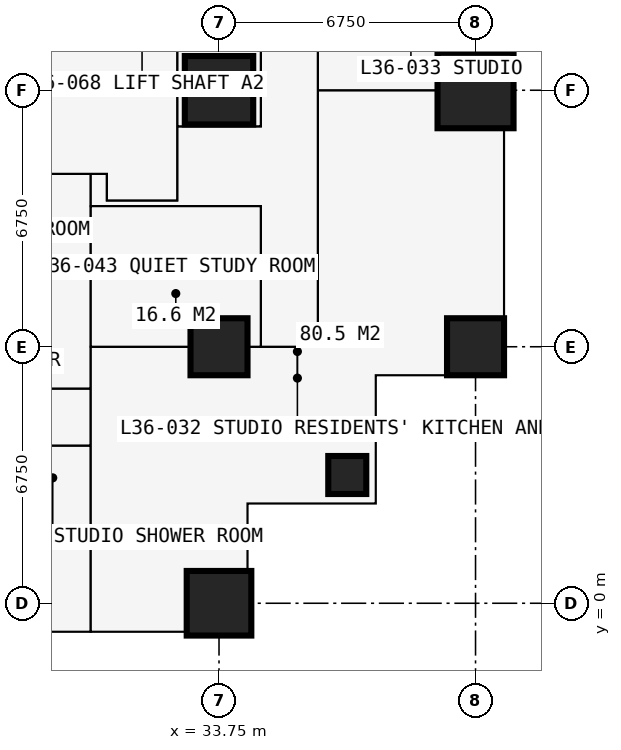
"""IFC4 building model, lengths in metres.
Left out: names, types, materials, properties, quantities, classifications, styles, units other than length and angle.
Written with IfcOpenShell. Run it as: python <this file> out.ifc"""

import sys

from ifc_helpers import new_model, si_unit, direction, frame, frame_2d, origin, origin_2d, place, context, subcontext, project, spatial, rectangle, extrude, element, fill, save


model = new_model("IFC4")
c1 = context("Model", 3, precision=1e-05, world=origin(), true_north=direction((0.0, 1.0)))
c2 = subcontext(c1, "Body", "Model", "MODEL_VIEW")
j1 = project(units=[si_unit("LENGTHUNIT", "METRE"), si_unit("PLANEANGLEUNIT", "RADIAN")], contexts=[c1])
p1 = place(None, origin())
s1 = spatial("IfcSite", under=j1, at=p1, CompositionType="ELEMENT")
p2 = place(p1, origin())
s2 = spatial("IfcBuilding", under=s1, at=p2, CompositionType="ELEMENT")
p3 = place(p2, frame((0.0, 0.0, 134.1)))
s3 = spatial("IfcBuildingStorey", under=s2, at=p3, CompositionType="ELEMENT", Elevation=134.1)
p4 = place(p3, frame((33.75, 0.0, 0.0), z_axis=(0.0, 0.0, 1.0), x_axis=(1.0, 0.0, 0.0)))
e1 = element("IfcColumn", 1, at=p4, inside=s3, PredefinedType="COLUMN", context=c2, shape_type="SweptSolid", body=[
    extrude(rectangle(XDim=1.7, YDim=1.7, at=origin_2d()), origin(), (0.0, 0.0, 1.0), 3.6),
])
p5 = place(p3, frame((33.75, 6.75, 0.0), z_axis=(0.0, 0.0, 1.0), x_axis=(1.0, 0.0, 0.0)))
e2 = element("IfcColumn", 2, at=p5, inside=s3, PredefinedType="COLUMN", context=c2, shape_type="SweptSolid", body=[
    extrude(rectangle(XDim=1.5, YDim=1.5, at=origin_2d()), origin(), (0.0, 0.0, 1.0), 3.6),
])
p6 = place(p3, frame((33.75, 13.5, 0.0), z_axis=(0.0, 0.0, 1.0), x_axis=(1.0, 0.0, 0.0)))
e3 = element("IfcColumn", 3, at=p6, inside=s3, PredefinedType="COLUMN", context=c2, shape_type="SweptSolid", body=[
    extrude(rectangle(XDim=1.8, YDim=1.8, at=origin_2d()), origin(), (0.0, 0.0, 1.0), 3.6),
])
p7 = place(p3, frame((37.125, 3.375, 0.0), z_axis=(0.0, 0.0, 1.0), x_axis=(1.0, 0.0, 0.0)))
e4 = element("IfcColumn", 4, at=p7, inside=s3, PredefinedType="COLUMN", context=c2, shape_type="SweptSolid", body=[
    extrude(rectangle(XDim=1.0, YDim=1.0, at=origin_2d()), origin(), (0.0, 0.0, 1.0), 3.6),
])
p8 = place(p3, frame((40.5, 6.75, 0.0), z_axis=(0.0, 0.0, 1.0), x_axis=(1.0, 0.0, 0.0)))
e5 = element("IfcColumn", 5, at=p8, inside=s3, PredefinedType="COLUMN", context=c2, shape_type="SweptSolid", body=[
    extrude(rectangle(XDim=1.5, YDim=1.5, at=origin_2d()), origin(), (0.0, 0.0, 1.0), 3.6),
])
p9 = place(p3, frame((40.5, 13.5, 0.0), z_axis=(0.0, 0.0, 1.0), x_axis=(1.0, 0.0, 0.0)))
e6 = element("IfcColumn", 6, at=p9, inside=s3, PredefinedType="COLUMN", context=c2, shape_type="SweptSolid", body=[
    extrude(rectangle(XDim=2.0, YDim=2.0, at=origin_2d()), origin(), (0.0, 0.0, 1.0), 3.6),
])
p10 = place(p3, frame((34.5, -0.75, 0.0), z_axis=(0.0, 0.0, 1.0), x_axis=(0.0, 1.0, 0.0)))
e7 = element("IfcWall", 7, at=p10, inside=s3, PredefinedType="SOLIDWALL", context=c2, shape_type="SweptSolid", body=[
    extrude(rectangle(XDim=3.375, YDim=0.3, at=frame_2d((1.688, 0.0))), origin(), (0.0, 0.0, 1.0), 3.3),
])
p11 = place(p10, frame((1.657, 0.0, 0.9)))
e8 = element("IfcOpeningElement", 8, at=p11, cuts=e7, PredefinedType="OPENING", context=c2, shape_type="SweptSolid", body=[
    extrude(rectangle(XDim=1.5, YDim=1.8, at=frame_2d((0.75, 0.9))), frame((0.0, 0.16, 0.0), z_axis=(0.0, -1.0, 0.0), x_axis=(1.0, 0.0, 0.0)), (0.0, 0.0, 1.0), 0.32),
])
p12 = place(p3, frame((34.5, 2.625, 0.0), z_axis=(0.0, 0.0, 1.0), x_axis=(1.0, 0.0, 0.0)))
e9 = element("IfcWall", 9, at=p12, inside=s3, PredefinedType="SOLIDWALL", context=c2, shape_type="SweptSolid", body=[
    extrude(rectangle(XDim=3.375, YDim=0.3, at=frame_2d((1.688, 0.0))), origin(), (0.0, 0.0, 1.0), 3.3),
])
p13 = place(p12, frame((0.788, 0.0, 0.6)))
e10 = element("IfcOpeningElement", 10, at=p13, cuts=e9, PredefinedType="OPENING", context=c2, shape_type="SweptSolid", body=[
    extrude(rectangle(XDim=1.8, YDim=2.1, at=frame_2d((0.9, 1.05))), frame((0.0, 0.16, 0.0), z_axis=(0.0, -1.0, 0.0), x_axis=(1.0, 0.0, 0.0)), (0.0, 0.0, 1.0), 0.32),
])
p14 = place(p3, frame((37.875, 2.625, 0.0), z_axis=(0.0, 0.0, 1.0), x_axis=(0.0, 1.0, 0.0)))
e11 = element("IfcWall", 11, at=p14, inside=s3, PredefinedType="SOLIDWALL", context=c2, shape_type="SweptSolid", body=[
    extrude(rectangle(XDim=3.375, YDim=0.3, at=frame_2d((1.688, 0.0))), origin(), (0.0, 0.0, 1.0), 3.3),
])
p15 = place(p14, frame((0.788, 0.0, 0.6)))
e12 = element("IfcOpeningElement", 12, at=p15, cuts=e11, PredefinedType="OPENING", context=c2, shape_type="SweptSolid", body=[
    extrude(rectangle(XDim=1.8, YDim=2.1, at=frame_2d((0.9, 1.05))), frame((0.0, 0.16, 0.0), z_axis=(0.0, -1.0, 0.0), x_axis=(1.0, 0.0, 0.0)), (0.0, 0.0, 1.0), 0.32),
])
p16 = place(p3, frame((37.875, 6.0, 0.0), z_axis=(0.0, 0.0, 1.0), x_axis=(1.0, 0.0, 0.0)))
e13 = element("IfcWall", 13, at=p16, inside=s3, PredefinedType="SOLIDWALL", context=c2, shape_type="SweptSolid", body=[
    extrude(rectangle(XDim=3.375, YDim=0.3, at=frame_2d((1.688, 0.0))), origin(), (0.0, 0.0, 1.0), 3.3),
])
p17 = place(p16, frame((0.268, 0.0, 0.9)))
e14 = element("IfcOpeningElement", 14, at=p17, cuts=e13, PredefinedType="OPENING", context=c2, shape_type="SweptSolid", body=[
    extrude(rectangle(XDim=1.5, YDim=1.8, at=frame_2d((0.75, 0.9))), frame((0.0, 0.16, 0.0), z_axis=(0.0, -1.0, 0.0), x_axis=(1.0, 0.0, 0.0)), (0.0, 0.0, 1.0), 0.32),
])
p18 = place(p3, frame((6.75, 4.15, 0.0), z_axis=(0.0, 0.0, 1.0), x_axis=(1.0, 0.0, 0.0)))
e15 = element("IfcWall", 15, at=p18, inside=s3, PredefinedType="PARTITIONING", context=c2, shape_type="SweptSolid", body=[
    extrude(rectangle(XDim=23.625, YDim=0.1, at=frame_2d((11.812, 0.0))), origin(), (0.0, 0.0, 1.0), 3.3),
])
p19 = place(p18, frame((2.85, 0.0, 0.0)))
e16 = element("IfcOpeningElement", 16, at=p19, cuts=e15, PredefinedType="OPENING", context=c2, shape_type="SweptSolid", body=[
    extrude(rectangle(XDim=1.0, YDim=2.2, at=frame_2d((0.5, 1.1))), frame((0.0, 0.06, 0.0), z_axis=(0.0, -1.0, 0.0), x_axis=(1.0, 0.0, 0.0)), (0.0, 0.0, 1.0), 0.12),
])
p20 = place(p18, frame((6.95, 0.0, 0.0)))
e17 = element("IfcOpeningElement", 17, at=p20, cuts=e15, PredefinedType="OPENING", context=c2, shape_type="SweptSolid", body=[
    extrude(rectangle(XDim=0.95, YDim=2.2, at=frame_2d((0.475, 1.1))), frame((0.0, 0.06, 0.0), z_axis=(0.0, -1.0, 0.0), x_axis=(1.0, 0.0, 0.0)), (0.0, 0.0, 1.0), 0.12),
])
p21 = place(p18, frame((10.375, 0.0, 0.0)))
e18 = element("IfcOpeningElement", 18, at=p21, cuts=e15, PredefinedType="OPENING", context=c2, shape_type="SweptSolid", body=[
    extrude(rectangle(XDim=0.95, YDim=2.2, at=frame_2d((0.475, 1.1))), frame((0.0, 0.06, 0.0), z_axis=(0.0, -1.0, 0.0), x_axis=(1.0, 0.0, 0.0)), (0.0, 0.0, 1.0), 0.12),
])
p22 = place(p18, frame((15.1, 0.0, 0.0)))
e19 = element("IfcOpeningElement", 19, at=p22, cuts=e15, PredefinedType="OPENING", context=c2, shape_type="SweptSolid", body=[
    extrude(rectangle(XDim=0.95, YDim=2.2, at=frame_2d((0.475, 1.1))), frame((0.0, 0.06, 0.0), z_axis=(0.0, -1.0, 0.0), x_axis=(1.0, 0.0, 0.0)), (0.0, 0.0, 1.0), 0.12),
])
p23 = place(p18, frame((20.5, 0.0, 0.0)))
e20 = element("IfcOpeningElement", 20, at=p23, cuts=e15, PredefinedType="OPENING", context=c2, shape_type="SweptSolid", body=[
    extrude(rectangle(XDim=0.95, YDim=2.2, at=frame_2d((0.475, 1.1))), frame((0.0, 0.06, 0.0), z_axis=(0.0, -1.0, 0.0), x_axis=(1.0, 0.0, 0.0)), (0.0, 0.0, 1.0), 0.12),
])
p24 = place(p3, frame((10.125, 11.3, 0.0), z_axis=(0.0, 0.0, 1.0), x_axis=(1.0, 0.0, 0.0)))
e21 = element("IfcWall", 21, at=p24, inside=s3, PredefinedType="PARTITIONING", context=c2, shape_type="SweptSolid", body=[
    extrude(rectangle(XDim=20.675, YDim=0.15, at=frame_2d((10.337, 0.0))), origin(), (0.0, 0.0, 1.0), 3.3),
])
p25 = place(p24, frame((8.375, 0.0, 0.0)))
e22 = element("IfcOpeningElement", 22, at=p25, cuts=e21, PredefinedType="OPENING", context=c2, shape_type="SweptSolid", body=[
    extrude(rectangle(XDim=1.0, YDim=2.2, at=frame_2d((0.5, 1.1))), frame((0.0, 0.085, 0.0), z_axis=(0.0, -1.0, 0.0), x_axis=(1.0, 0.0, 0.0)), (0.0, 0.0, 1.0), 0.17),
])
p26 = place(p24, frame((10.975, 0.0, 0.0)))
e23 = element("IfcOpeningElement", 23, at=p26, cuts=e21, PredefinedType="OPENING", context=c2, shape_type="SweptSolid", body=[
    extrude(rectangle(XDim=1.0, YDim=2.2, at=frame_2d((0.5, 1.1))), frame((0.0, 0.085, 0.0), z_axis=(0.0, -1.0, 0.0), x_axis=(1.0, 0.0, 0.0)), (0.0, 0.0, 1.0), 0.17),
])
p27 = place(p24, frame((3.925, 0.0, 0.0)))
e24 = element("IfcOpeningElement", 24, at=p27, cuts=e21, PredefinedType="OPENING", context=c2, shape_type="SweptSolid", body=[
    extrude(rectangle(XDim=0.95, YDim=2.2, at=frame_2d((0.475, 1.1))), frame((0.0, 0.085, 0.0), z_axis=(0.0, -1.0, 0.0), x_axis=(1.0, 0.0, 0.0)), (0.0, 0.0, 1.0), 0.17),
])
p28 = place(p3, frame((22.988, 5.65, 0.0), z_axis=(0.0, 0.0, 1.0), x_axis=(1.0, 0.0, 0.0)))
e25 = element("IfcWall", 25, at=p28, inside=s3, PredefinedType="PARTITIONING", context=c2, shape_type="SweptSolid", body=[
    extrude(rectangle(XDim=7.387, YDim=0.15, at=frame_2d((3.694, 0.0))), origin(), (0.0, 0.0, 1.0), 3.3),
])
p29 = place(p28, frame((2.15, 0.0, 0.0)))
e26 = element("IfcOpeningElement", 26, at=p29, cuts=e25, PredefinedType="OPENING", context=c2, shape_type="SweptSolid", body=[
    extrude(rectangle(XDim=0.95, YDim=2.2, at=frame_2d((0.475, 1.1))), frame((0.0, 0.085, 0.0), z_axis=(0.0, -1.0, 0.0), x_axis=(1.0, 0.0, 0.0)), (0.0, 0.0, 1.0), 0.17),
])
p30 = place(p3, frame((28.375, 1.95, 0.0), z_axis=(0.0, 0.0, 1.0), x_axis=(1.0, 0.0, 0.0)))
e27 = element("IfcWall", 27, at=p30, inside=s3, PredefinedType="PARTITIONING", context=c2, shape_type="SweptSolid", body=[
    extrude(rectangle(XDim=2.0, YDim=0.1, at=frame_2d((1.0, 0.0))), origin(), (0.0, 0.0, 1.0), 3.3),
])
p31 = place(p3, frame((30.375, -0.734, 0.0), z_axis=(0.0, 0.0, 1.0), x_axis=(0.0, 1.0, 0.0)))
e28 = element("IfcWall", 28, at=p31, inside=s3, PredefinedType="PARTITIONING", context=c2, shape_type="SweptSolid", body=[
    extrude(rectangle(XDim=12.034, YDim=0.15, at=frame_2d((6.017, 0.0))), origin(), (0.0, 0.0, 1.0), 3.3),
])
p32 = place(p31, frame((5.134, 0.0, 0.0)))
e29 = element("IfcOpeningElement", 29, at=p32, cuts=e28, PredefinedType="OPENING", context=c2, shape_type="SweptSolid", body=[
    extrude(rectangle(XDim=1.0, YDim=2.2, at=frame_2d((0.5, 1.1))), frame((0.0, 0.085, 0.0), z_axis=(0.0, -1.0, 0.0), x_axis=(1.0, 0.0, 0.0)), (0.0, 0.0, 1.0), 0.17),
])
p33 = place(p3, frame((30.375, 6.75, 0.0), z_axis=(0.0, 0.0, 1.0), x_axis=(1.0, 0.0, 0.0)))
e30 = element("IfcWall", 30, at=p33, inside=s3, PredefinedType="PARTITIONING", context=c2, shape_type="SweptSolid", body=[
    extrude(rectangle(XDim=5.975, YDim=0.15, at=frame_2d((2.988, 0.0))), origin(), (0.0, 0.0, 1.0), 2.802),
])
p34 = place(p3, frame((30.375, 10.45, 0.0), z_axis=(0.0, 0.0, 1.0), x_axis=(1.0, 0.0, 0.0)))
e31 = element("IfcWall", 31, at=p34, inside=s3, PredefinedType="PARTITIONING", context=c2, shape_type="SweptSolid", body=[
    extrude(rectangle(XDim=4.475, YDim=0.15, at=frame_2d((2.238, 0.0))), origin(), (0.0, 0.0, 1.0), 3.3),
])
p35 = place(p34, frame((2.35, 0.0, 0.0)))
e32 = element("IfcOpeningElement", 32, at=p35, cuts=e31, PredefinedType="OPENING", context=c2, shape_type="SweptSolid", body=[
    extrude(rectangle(XDim=0.95, YDim=2.2, at=frame_2d((0.475, 1.1))), frame((0.0, 0.085, 0.0), z_axis=(0.0, -1.0, 0.0), x_axis=(1.0, 0.0, 0.0)), (0.0, 0.0, 1.0), 0.17),
])
p36 = place(p3, frame((30.8, 10.6, 0.0), z_axis=(0.0, 0.0, 1.0), x_axis=(0.0, 1.0, 0.0)))
e33 = element("IfcWall", 33, at=p36, inside=s3, PredefinedType="PARTITIONING", context=c2, shape_type="SweptSolid", body=[
    extrude(rectangle(XDim=0.7, YDim=0.15, at=frame_2d((0.35, 0.0))), origin(), (0.0, 0.0, 1.0), 3.3),
])
p37 = place(p3, frame((30.8, 10.6, 0.0), z_axis=(0.0, 0.0, 1.0), x_axis=(1.0, 0.0, 0.0)))
e34 = element("IfcWall", 34, at=p37, inside=s3, PredefinedType="PARTITIONING", context=c2, shape_type="SweptSolid", body=[
    extrude(rectangle(XDim=1.85, YDim=0.15, at=frame_2d((0.925, 0.0))), origin(), (0.0, 0.0, 1.0), 3.3),
])
p38 = place(p3, frame((32.65, 10.6, 0.0), z_axis=(0.0, 0.0, 1.0), x_axis=(0.0, 1.0, 0.0)))
e35 = element("IfcWall", 35, at=p38, inside=s3, PredefinedType="SHEAR", context=c2, shape_type="SweptSolid", body=[
    extrude(rectangle(XDim=9.3, YDim=0.1, at=frame_2d((4.65, 0.0))), origin(), (0.0, 0.0, 1.0), 3.3),
])
p39 = place(p38, frame((0.5, 0.0, 0.0)))
e36 = element("IfcOpeningElement", 36, at=p39, cuts=e35, PredefinedType="OPENING", context=c2, shape_type="SweptSolid", body=[
    extrude(rectangle(XDim=1.0, YDim=2.2, at=frame_2d((0.5, 1.1))), frame((0.0, 0.06, 0.0), z_axis=(0.0, -1.0, 0.0), x_axis=(1.0, 0.0, 0.0)), (0.0, 0.0, 1.0), 0.12),
])
p40 = place(p3, frame((32.65, 12.55, 0.0), z_axis=(0.0, 0.0, 1.0), x_axis=(1.0, 0.0, 0.0)))
e37 = element("IfcWall", 37, at=p40, inside=s3, PredefinedType="PARTITIONING", context=c2, shape_type="SweptSolid", body=[
    extrude(rectangle(XDim=2.2, YDim=0.15, at=frame_2d((1.1, 0.0))), origin(), (0.0, 0.0, 1.0), 3.3),
])
p41 = place(p3, frame((34.85, 6.75, 0.0), z_axis=(0.0, 0.0, 1.0), x_axis=(0.0, 1.0, 0.0)))
e38 = element("IfcWall", 38, at=p41, inside=s3, PredefinedType="PARTITIONING", context=c2, shape_type="SweptSolid", body=[
    extrude(rectangle(XDim=3.7, YDim=0.15, at=frame_2d((1.85, 0.0))), origin(), (0.0, 0.0, 1.0), 3.3),
])
p42 = place(p3, frame((34.85, 12.55, 0.0), z_axis=(0.0, 0.0, 1.0), x_axis=(0.0, 1.0, 0.0)))
e39 = element("IfcWall", 39, at=p42, inside=s3, PredefinedType="PARTITIONING", context=c2, shape_type="SweptSolid", body=[
    extrude(rectangle(XDim=17.825, YDim=0.15, at=frame_2d((8.913, 0.0))), origin(), (0.0, 0.0, 1.0), 3.3),
])
p43 = place(p42, frame((8.5, 0.0, 0.0)))
e40 = element("IfcOpeningElement", 40, at=p43, cuts=e39, PredefinedType="OPENING", context=c2, shape_type="SweptSolid", body=[
    extrude(rectangle(XDim=0.95, YDim=2.2, at=frame_2d((0.475, 1.1))), frame((0.0, 0.085, 0.0), z_axis=(0.0, -1.0, 0.0), x_axis=(1.0, 0.0, 0.0)), (0.0, 0.0, 1.0), 0.17),
])
p44 = place(p3, frame((36.35, 6.75, 0.0), z_axis=(0.0, 0.0, 1.0), x_axis=(0.0, 1.0, 0.0)))
e41 = element("IfcWall", 41, at=p44, inside=s3, PredefinedType="PARTITIONING", context=c2, shape_type="SweptSolid", body=[
    extrude(rectangle(XDim=20.25, YDim=0.15, at=frame_2d((10.125, 0.0))), origin(), (0.0, 0.0, 1.0), 3.3),
])
p45 = place(p44, frame((6.95, 0.0, 0.0)))
e42 = element("IfcOpeningElement", 42, at=p45, cuts=e41, PredefinedType="OPENING", context=c2, shape_type="SweptSolid", body=[
    extrude(rectangle(XDim=0.95, YDim=2.2, at=frame_2d((0.475, 1.1))), frame((0.0, 0.085, 0.0), z_axis=(0.0, -1.0, 0.0), x_axis=(1.0, 0.0, 0.0)), (0.0, 0.0, 1.0), 0.17),
])
p46 = place(p44, frame((10.375, 0.0, 0.0)))
e43 = element("IfcOpeningElement", 43, at=p46, cuts=e41, PredefinedType="OPENING", context=c2, shape_type="SweptSolid", body=[
    extrude(rectangle(XDim=0.95, YDim=2.2, at=frame_2d((0.475, 1.1))), frame((0.0, 0.085, 0.0), z_axis=(0.0, -1.0, 0.0), x_axis=(1.0, 0.0, 0.0)), (0.0, 0.0, 1.0), 0.17),
])
p47 = place(p44, frame((13.75, 0.0, 0.0)))
e44 = element("IfcOpeningElement", 44, at=p47, cuts=e41, PredefinedType="OPENING", context=c2, shape_type="SweptSolid", body=[
    extrude(rectangle(XDim=0.95, YDim=2.2, at=frame_2d((0.475, 1.1))), frame((0.0, 0.085, 0.0), z_axis=(0.0, -1.0, 0.0), x_axis=(1.0, 0.0, 0.0)), (0.0, 0.0, 1.0), 0.17),
])
p48 = place(p44, frame((17.125, 0.0, 0.0)))
e45 = element("IfcOpeningElement", 45, at=p48, cuts=e41, PredefinedType="OPENING", context=c2, shape_type="SweptSolid", body=[
    extrude(rectangle(XDim=0.95, YDim=2.2, at=frame_2d((0.475, 1.1))), frame((0.0, 0.085, 0.0), z_axis=(0.0, -1.0, 0.0), x_axis=(1.0, 0.0, 0.0)), (0.0, 0.0, 1.0), 0.17),
])
p49 = place(p3, frame((36.35, 13.5, 0.0), z_axis=(0.0, 0.0, 1.0), x_axis=(1.0, 0.0, 0.0)))
e46 = element("IfcWall", 46, at=p49, inside=s3, PredefinedType="PARTITIONING", context=c2, shape_type="SweptSolid", body=[
    extrude(rectangle(XDim=4.884, YDim=0.15, at=frame_2d((2.442, 0.0))), origin(), (0.0, 0.0, 1.0), 2.802),
])
p50 = place(p11, origin())
e47 = element("IfcWindow", 47, at=p50, inside=s3, PartitioningType="SINGLE_PANEL", PredefinedType="WINDOW", context=c2, shape_type="SweptSolid", body=[
    extrude(rectangle(XDim=1.5, YDim=1.8, at=frame_2d((0.75, 0.9))), frame((0.0, 0.03, 0.0), z_axis=(0.0, -1.0, 0.0), x_axis=(1.0, 0.0, 0.0)), (0.0, 0.0, 1.0), 0.06),
])
fill(e8, e47)
p51 = place(p13, origin())
e48 = element("IfcWindow", 48, at=p51, inside=s3, PartitioningType="SINGLE_PANEL", PredefinedType="WINDOW", context=c2, shape_type="SweptSolid", body=[
    extrude(rectangle(XDim=1.8, YDim=2.1, at=frame_2d((0.9, 1.05))), frame((0.0, 0.03, 0.0), z_axis=(0.0, -1.0, 0.0), x_axis=(1.0, 0.0, 0.0)), (0.0, 0.0, 1.0), 0.06),
])
fill(e10, e48)
p52 = place(p15, origin())
e49 = element("IfcWindow", 49, at=p52, inside=s3, PartitioningType="SINGLE_PANEL", PredefinedType="WINDOW", context=c2, shape_type="SweptSolid", body=[
    extrude(rectangle(XDim=1.8, YDim=2.1, at=frame_2d((0.9, 1.05))), frame((0.0, 0.03, 0.0), z_axis=(0.0, -1.0, 0.0), x_axis=(1.0, 0.0, 0.0)), (0.0, 0.0, 1.0), 0.06),
])
fill(e12, e49)
p53 = place(p17, origin())
e50 = element("IfcWindow", 50, at=p53, inside=s3, PartitioningType="SINGLE_PANEL", PredefinedType="WINDOW", context=c2, shape_type="SweptSolid", body=[
    extrude(rectangle(XDim=1.5, YDim=1.8, at=frame_2d((0.75, 0.9))), frame((0.0, 0.03, 0.0), z_axis=(0.0, -1.0, 0.0), x_axis=(1.0, 0.0, 0.0)), (0.0, 0.0, 1.0), 0.06),
])
fill(e14, e50)
p54 = place(p32, origin())
e51 = element("IfcDoor", 51, at=p54, inside=s3, OperationType="SINGLE_SWING_LEFT", PredefinedType="DOOR", context=c2, shape_type="SweptSolid", body=[
    extrude(rectangle(XDim=1.0, YDim=2.2, at=frame_2d((0.5, 1.1))), frame((0.0, 0.025, 0.0), z_axis=(0.0, -1.0, 0.0), x_axis=(1.0, 0.0, 0.0)), (0.0, 0.0, 1.0), 0.05),
])
fill(e29, e51)
p55 = place(p45, origin())
e52 = element("IfcDoor", 52, at=p55, inside=s3, OperationType="SINGLE_SWING_LEFT", PredefinedType="DOOR", context=c2, shape_type="SweptSolid", body=[
    extrude(rectangle(XDim=0.95, YDim=2.2, at=frame_2d((0.475, 1.1))), frame((0.0, 0.025, 0.0), z_axis=(0.0, -1.0, 0.0), x_axis=(1.0, 0.0, 0.0)), (0.0, 0.0, 1.0), 0.05),
])
fill(e42, e52)
p56 = place(p39, origin())
e53 = element("IfcDoor", 53, at=p56, inside=s3, OperationType="SINGLE_SWING_LEFT", PredefinedType="DOOR", context=c2, shape_type="SweptSolid", body=[
    extrude(rectangle(XDim=1.0, YDim=2.2, at=frame_2d((0.5, 1.1))), frame((0.0, 0.025, 0.0), z_axis=(0.0, -1.0, 0.0), x_axis=(1.0, 0.0, 0.0)), (0.0, 0.0, 1.0), 0.05),
])
fill(e36, e53)
p57 = place(p35, origin())
e54 = element("IfcDoor", 54, at=p57, inside=s3, OperationType="SINGLE_SWING_LEFT", PredefinedType="DOOR", context=c2, shape_type="SweptSolid", body=[
    extrude(rectangle(XDim=0.95, YDim=2.2, at=frame_2d((0.475, 1.1))), frame((0.0, 0.025, 0.0), z_axis=(0.0, -1.0, 0.0), x_axis=(1.0, 0.0, 0.0)), (0.0, 0.0, 1.0), 0.05),
])
fill(e32, e54)
save(model, sys.argv[1])
